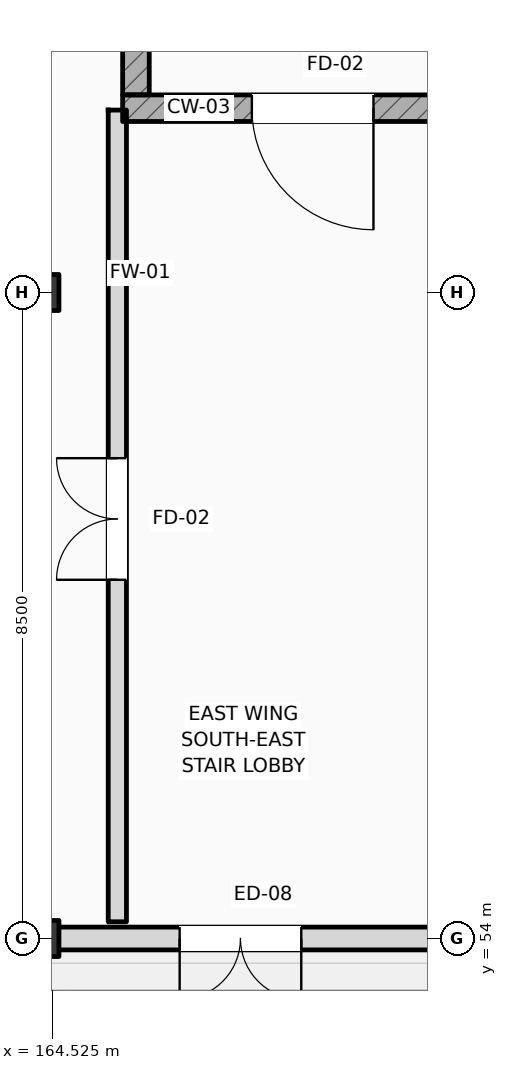
"""IFC4 building model, lengths in metres.
Left out: names, types, materials, properties, quantities, classifications, styles, units other than length and angle.
Written with IfcOpenShell. Run it as: python <this file> out.ifc"""

import sys

from ifc_helpers import new_model, si_unit, direction, frame, frame_2d, origin, origin_2d, place, context, subcontext, project, spatial, rectangle, i_section, extrude, element, fill, save


model = new_model("IFC4")
c1 = context("Model", 3, precision=1e-05, world=origin(), true_north=direction((0.0, 1.0)))
c2 = subcontext(c1, "Body", "Model", "MODEL_VIEW")
j1 = project(units=[si_unit("LENGTHUNIT", "METRE"), si_unit("PLANEANGLEUNIT", "RADIAN")], contexts=[c1])
p1 = place(None, origin())
s1 = spatial("IfcSite", under=j1, at=p1, CompositionType="ELEMENT")
p2 = place(p1, origin())
s2 = spatial("IfcBuilding", under=s1, at=p2, CompositionType="ELEMENT")
p3 = place(p2, origin())
s3 = spatial("IfcBuildingStorey", under=s2, at=p3, CompositionType="ELEMENT", Elevation=0.0)
for number, where, z_axis, x_axis in (
    (1, (164.4, 54.0, 0.0), (0.0, 0.0, 1.0), (1.0, 0.0, 0.0)),
    (2, (164.4, 62.5, 0.0), (0.0, 0.0, 1.0), (1.0, 0.0, 0.0)),
):
    element("IfcColumn", number, at=place(p3, frame(where, z_axis=z_axis, x_axis=x_axis)), inside=s3, PredefinedType="COLUMN", context=c2, shape_type="SweptSolid", body=[
        extrude(i_section(OverallWidth=0.424, OverallDepth=0.474, WebThickness=0.045, FlangeThickness=0.055, FilletRadius=0.015, at=origin_2d()), origin(), (0.0, 0.0, 1.0), 6.0),
    ])
p4 = place(p3, frame((165.45, 64.925, 0.0), z_axis=(0.0, 0.0, 1.0), x_axis=(1.0, 0.0, 0.0)))
e3 = element("IfcWall", 3, at=p4, inside=s3, PredefinedType="SHEAR", context=c2, shape_type="SweptSolid", body=[
    extrude(rectangle(XDim=5.0, YDim=0.35, at=frame_2d((2.5, 0.0))), origin(), (0.0, 0.0, 1.0), 6.0),
])
p5 = place(p4, frame((1.7, 0.0, 0.0)))
e4 = element("IfcOpeningElement", 4, at=p5, cuts=e3, PredefinedType="OPENING", context=c2, shape_type="SweptSolid", body=[
    extrude(rectangle(XDim=1.6, YDim=2.2, at=frame_2d((0.8, 1.1))), frame((0.0, 0.185, 0.0), z_axis=(0.0, -1.0, 0.0), x_axis=(1.0, 0.0, 0.0)), (0.0, 0.0, 1.0), 0.37),
])
p6 = place(p3, frame((165.625, 65.1, 0.0), z_axis=(0.0, 0.0, 1.0), x_axis=(0.0, 1.0, 0.0)))
e5 = element("IfcWall", 5, at=p6, inside=s3, PredefinedType="SHEAR", context=c2, shape_type="SweptSolid", body=[
    extrude(rectangle(XDim=8.58, YDim=0.35, at=frame_2d((4.29, 0.0))), origin(), (0.0, 0.0, 1.0), 6.0),
])
p7 = place(p3, frame((164.4, 54.0, 0.0), z_axis=(0.0, 0.0, 1.0), x_axis=(1.0, 0.0, 0.0)))
e6 = element("IfcWall", 6, at=p7, inside=s3, PredefinedType="STANDARD", context=c2, shape_type="SweptSolid", body=[
    extrude(rectangle(XDim=7.6, YDim=0.3, at=frame_2d((3.8, 0.0))), origin(), (0.0, 0.0, 1.0), 5.19),
])
p8 = place(p7, frame((1.8, 0.0, 0.0)))
e7 = element("IfcOpeningElement", 7, at=p8, cuts=e6, PredefinedType="OPENING", context=c2, shape_type="SweptSolid", body=[
    extrude(rectangle(XDim=1.6, YDim=2.3, at=frame_2d((0.8, 1.15))), frame((0.0, 0.16, 0.0), z_axis=(0.0, -1.0, 0.0), x_axis=(1.0, 0.0, 0.0)), (0.0, 0.0, 1.0), 0.32),
])
p9 = place(p3, frame((165.38, 54.22, 0.0), z_axis=(0.0, 0.0, 1.0), x_axis=(0.0, 1.0, 0.0)))
e8 = element("IfcWall", 8, at=p9, inside=s3, PredefinedType="STANDARD", context=c2, shape_type="SweptSolid", body=[
    extrude(rectangle(XDim=10.68, YDim=0.24, at=frame_2d((5.34, 0.0))), origin(), (0.0, 0.0, 1.0), 5.7),
])
p10 = place(p9, frame((4.5, 0.0, 0.0)))
e9 = element("IfcOpeningElement", 9, at=p10, cuts=e8, PredefinedType="OPENING", context=c2, shape_type="SweptSolid", body=[
    extrude(rectangle(XDim=1.6, YDim=2.2, at=frame_2d((0.8, 1.1))), frame((0.0, 0.13, 0.0), z_axis=(0.0, -1.0, 0.0), x_axis=(1.0, 0.0, 0.0)), (0.0, 0.0, 1.0), 0.26),
])
p11 = place(p8, frame((1.6, 0.0, 0.0), z_axis=(0.0, 0.0, 1.0), x_axis=(-1.0, 0.0, 0.0)))
e10 = element("IfcDoor", 10, at=p11, inside=s3, OperationType="DOUBLE_SWING_LEFT", PredefinedType="DOOR", context=c2, shape_type="SweptSolid", body=[
    extrude(rectangle(XDim=1.6, YDim=2.3, at=frame_2d((0.8, 1.15))), frame((0.0, 0.025, 0.0), z_axis=(0.0, -1.0, 0.0), x_axis=(1.0, 0.0, 0.0)), (0.0, 0.0, 1.0), 0.05),
])
fill(e7, e10)
p12 = place(p5, frame((1.6, 0.0, 0.0), z_axis=(0.0, 0.0, 1.0), x_axis=(-1.0, 0.0, 0.0)))
e11 = element("IfcDoor", 11, at=p12, inside=s3, OperationType="SINGLE_SWING_RIGHT", PredefinedType="DOOR", context=c2, shape_type="SweptSolid", body=[
    extrude(rectangle(XDim=1.6, YDim=2.2, at=frame_2d((0.8, 1.1))), frame((0.0, 0.025, 0.0), z_axis=(0.0, -1.0, 0.0), x_axis=(1.0, 0.0, 0.0)), (0.0, 0.0, 1.0), 0.05),
])
fill(e4, e11)
p13 = place(p10, origin())
e12 = element("IfcDoor", 12, at=p13, inside=s3, OperationType="DOUBLE_SWING_LEFT", PredefinedType="DOOR", context=c2, shape_type="SweptSolid", body=[
    extrude(rectangle(XDim=1.6, YDim=2.2, at=frame_2d((0.8, 1.1))), frame((0.0, 0.025, 0.0), z_axis=(0.0, -1.0, 0.0), x_axis=(1.0, 0.0, 0.0)), (0.0, 0.0, 1.0), 0.05),
])
fill(e9, e12)
save(model, sys.argv[1])
